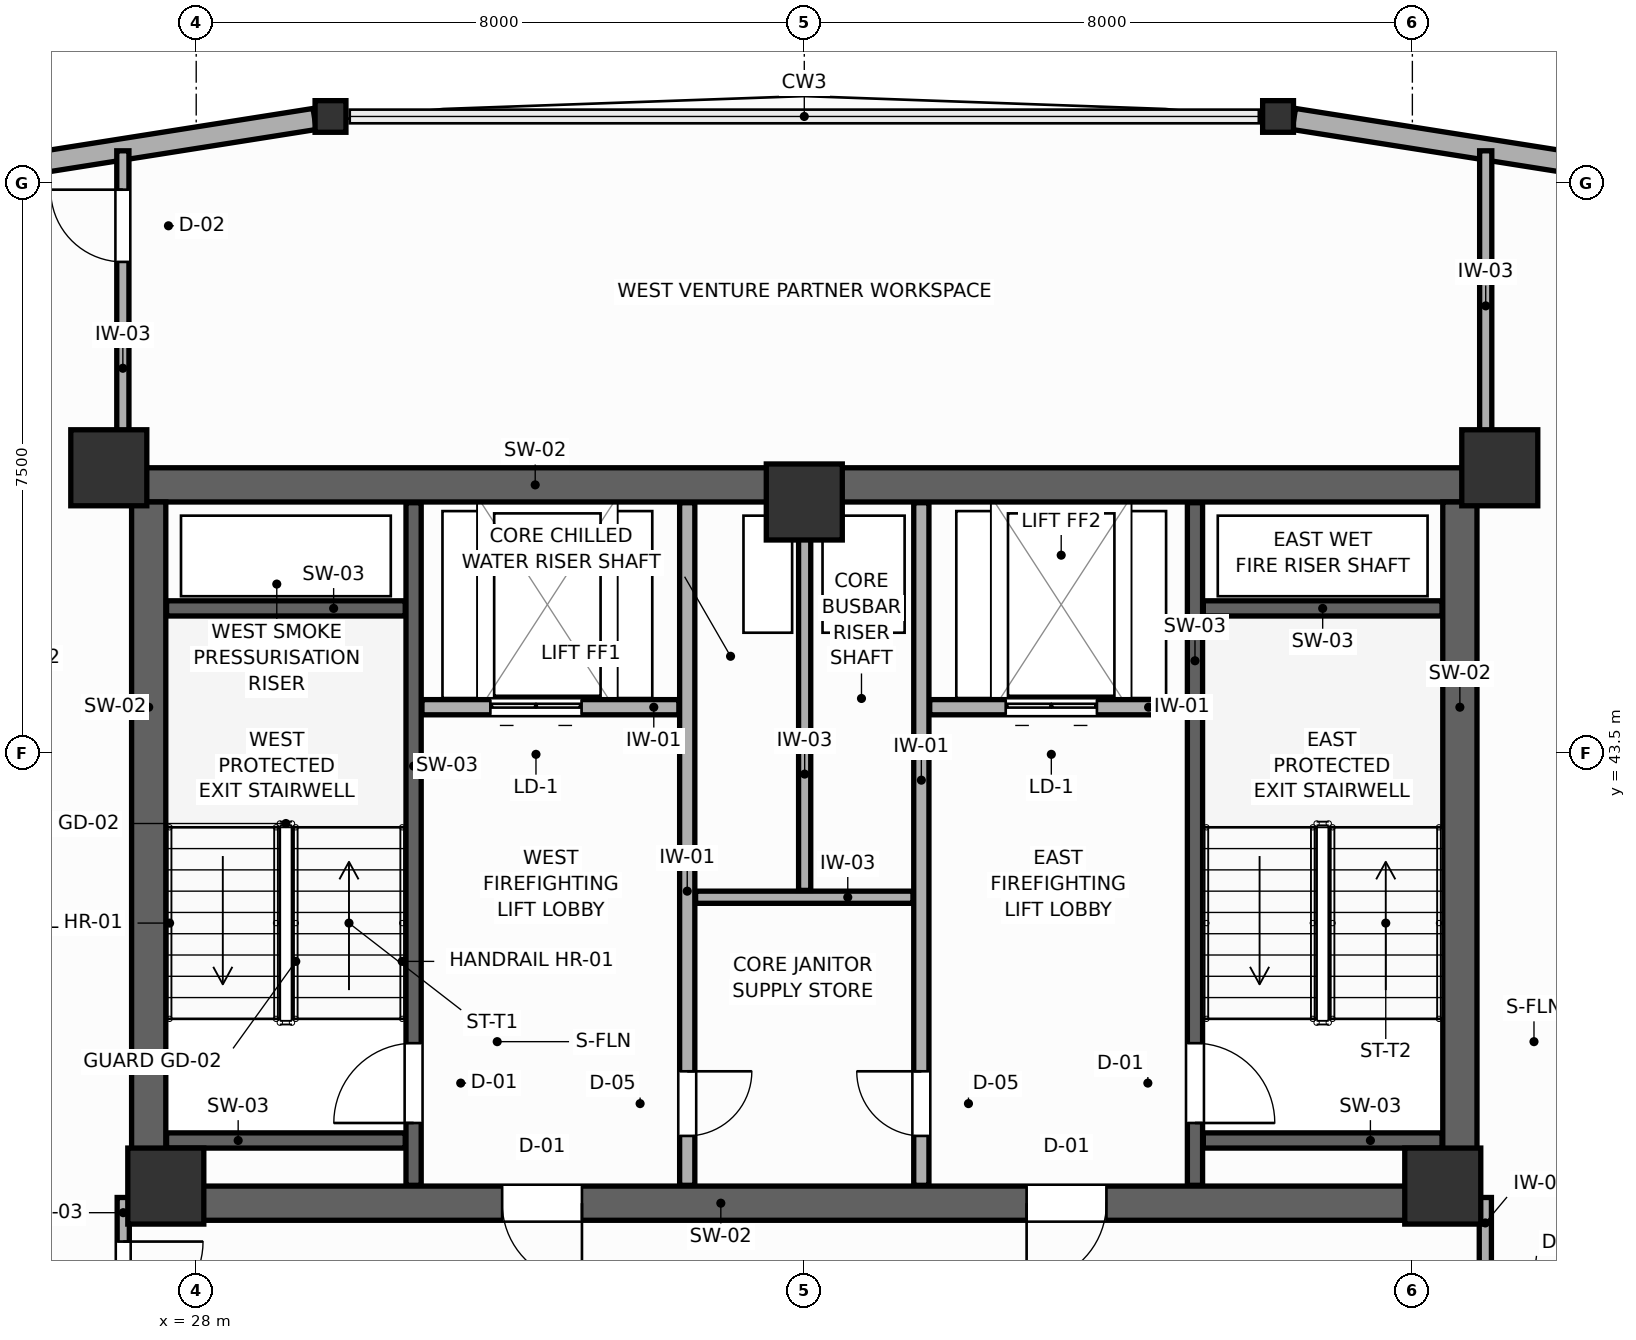
"""IFC4 building model, lengths in metres.
Left out: names, types, materials, properties, quantities, classifications, styles, units other than length and angle.
Written with IfcOpenShell. Run it as: python <this file> out.ifc"""

import sys

from ifc_helpers import new_model, si_unit, direction, frame, frame_2d, origin, origin_2d, place, context, subcontext, project, spatial, rectangle, i_section, extrude, source, transform, mapped, element, fill, save


model = new_model("IFC4")
c1 = context("Model", 3, precision=1e-05, world=origin(), true_north=direction((0.0, 1.0)))
c2 = subcontext(c1, "Body", "Model", "MODEL_VIEW")
j1 = project(units=[si_unit("LENGTHUNIT", "METRE"), si_unit("PLANEANGLEUNIT", "RADIAN")], contexts=[c1])
p1 = place(None, origin())
s1 = spatial("IfcSite", under=j1, at=p1, CompositionType="ELEMENT")
p2 = place(p1, origin())
s2 = spatial("IfcBuilding", under=s1, at=p2, CompositionType="ELEMENT")
p3 = place(p2, frame((0.0, 0.0, 193.8)))
s3 = spatial("IfcBuildingStorey", under=s2, at=p3, CompositionType="ELEMENT", Elevation=193.8)
p4 = place(p3, frame((27.15, 47.025, 0.0), z_axis=(0.0, 0.0, 1.0), x_axis=(1.0, 0.0, 0.0)))
e1 = element("IfcWall", 1, at=p4, inside=s3, PredefinedType="SHEAR", context=c2, shape_type="SweptSolid", body=[
    extrude(rectangle(XDim=17.7, YDim=0.45, at=frame_2d((8.85, 0.0))), origin(), (0.0, 0.0, 1.0), 3.6),
])
p5 = place(p3, frame((27.15, 37.575, 0.0), z_axis=(0.0, 0.0, 1.0), x_axis=(1.0, 0.0, 0.0)))
e2 = element("IfcWall", 2, at=p5, inside=s3, PredefinedType="SHEAR", context=c2, shape_type="SweptSolid", body=[
    extrude(rectangle(XDim=17.7, YDim=0.45, at=frame_2d((8.85, 0.0))), origin(), (0.0, 0.0, 1.0), 3.6),
])
p6 = place(p5, frame((4.875, 0.0, 0.0)))
e3 = element("IfcOpeningElement", 3, at=p6, cuts=e2, PredefinedType="OPENING", context=c2, shape_type="SweptSolid", body=[
    extrude(rectangle(XDim=1.05, YDim=2.1, at=frame_2d((0.525, 1.05))), frame((0.0, 0.235, 0.0), z_axis=(0.0, -1.0, 0.0), x_axis=(1.0, 0.0, 0.0)), (0.0, 0.0, 1.0), 0.47),
])
p7 = place(p5, frame((11.775, 0.0, 0.0)))
e4 = element("IfcOpeningElement", 4, at=p7, cuts=e2, PredefinedType="OPENING", context=c2, shape_type="SweptSolid", body=[
    extrude(rectangle(XDim=1.05, YDim=2.1, at=frame_2d((0.525, 1.05))), frame((0.0, 0.235, 0.0), z_axis=(0.0, -1.0, 0.0), x_axis=(1.0, 0.0, 0.0)), (0.0, 0.0, 1.0), 0.47),
])
for number, where, z_axis, x_axis in (
    (5, (27.375, 37.8, 0.0), (0.0, 0.0, 1.0), (0.0, 1.0, 0.0)),
    (6, (44.625, 37.8, 0.0), (0.0, 0.0, 1.0), (0.0, 1.0, 0.0)),
):
    element("IfcWall", number, at=place(p3, frame(where, z_axis=z_axis, x_axis=x_axis)), inside=s3, PredefinedType="SHEAR", context=c2, shape_type="SweptSolid", body=[
        extrude(rectangle(XDim=9.0, YDim=0.45, at=frame_2d((4.5, 0.0))), origin(), (0.0, 0.0, 1.0), 3.6),
    ])
m1 = source(origin(), c2, "Body", "SweptSolid", [
    extrude(rectangle(XDim=1.0, YDim=1.0, at=origin_2d()), origin(), (0.0, 0.0, 1.0), 3.6),
])
for number, where, z_axis, x_axis in (
    (7, (26.85, 47.25, 0.0), (0.0, 0.0, 1.0), (1.0, 0.0, 0.0)),
    (8, (45.15, 47.25, 0.0), (0.0, 0.0, 1.0), (1.0, 0.0, 0.0)),
    (9, (27.6, 37.8, 0.0), (0.0, 0.0, 1.0), (1.0, 0.0, 0.0)),
    (10, (44.4, 37.8, 0.0), (0.0, 0.0, 1.0), (1.0, 0.0, 0.0)),
    (11, (36.0, 46.8, 0.0), (0.0, 0.0, 1.0), (1.0, 0.0, 0.0)),
):
    element("IfcColumn", number, at=place(p3, frame(where, z_axis=z_axis, x_axis=x_axis)), inside=s3, PredefinedType="COLUMN", context=c2, shape_type="MappedRepresentation", body=[
        mapped(m1, transform((0.0, 0.0, 0.0), scale=1.0)),
    ])
m2 = source(origin(), c2, "Body", "SweptSolid", [
    extrude(i_section(OverallWidth=0.406, OverallDepth=0.416, WebThickness=0.027, FlangeThickness=0.044, FilletRadius=0.015, at=origin_2d()), origin(), (0.0, 0.0, 1.0), 3.6),
])
for number, where, z_axis, x_axis in (
    (12, (42.233, 51.872, 0.0), (0.0, 0.0, 1.0), (1.0, 0.0, 0.0)),
    (13, (29.767, 51.872, 0.0), (0.0, 0.0, 1.0), (1.0, 0.0, 0.0)),
):
    element("IfcColumn", number, at=place(p3, frame(where, z_axis=z_axis, x_axis=x_axis)), inside=s3, PredefinedType="COLUMN", context=c2, shape_type="MappedRepresentation", body=[
        mapped(m2, transform((0.0, 0.0, 0.0), scale=1.0)),
    ])
p8 = place(p3, frame((56.258, 49.656, 0.0), z_axis=(0.0, 0.0, 1.0), x_axis=(-0.987743003355, 0.15608894683, 0.0)))
e14 = element("IfcWall", 14, at=p8, inside=s3, PredefinedType="SOLIDWALL", context=c2, shape_type="SweptSolid", body=[
    extrude(rectangle(XDim=13.988, YDim=0.28, at=frame_2d((6.994, 0.0))), origin(), (0.0, 0.0, 1.0), 3.01),
])
p9 = place(p3, frame((29.559, 51.839, 0.0), z_axis=(0.0, 0.0, 1.0), x_axis=(-0.987743003355, -0.15608894683, 0.0)))
e15 = element("IfcWall", 15, at=p9, inside=s3, PredefinedType="SOLIDWALL", context=c2, shape_type="SweptSolid", body=[
    extrude(rectangle(XDim=13.988, YDim=0.28, at=frame_2d((6.994, 0.0))), origin(), (0.0, 0.0, 1.0), 2.95),
])
p10 = place(p3, frame((30.86, 37.81, 0.0), z_axis=(0.0, 0.0, 1.0), x_axis=(0.0, 1.0, 0.0)))
e16 = element("IfcWall", 16, at=p10, inside=s3, PredefinedType="SHEAR", context=c2, shape_type="SweptSolid", body=[
    extrude(rectangle(XDim=8.98, YDim=0.2, at=frame_2d((4.49, 0.0))), origin(), (0.0, 0.0, 1.0), 3.6),
])
p11 = place(p10, frame((0.82, 0.0, 0.0)))
e17 = element("IfcOpeningElement", 17, at=p11, cuts=e16, PredefinedType="OPENING", context=c2, shape_type="SweptSolid", body=[
    extrude(rectangle(XDim=1.05, YDim=2.1, at=frame_2d((0.525, 1.05))), frame((0.0, 0.11, 0.0), z_axis=(0.0, -1.0, 0.0), x_axis=(1.0, 0.0, 0.0)), (0.0, 0.0, 1.0), 0.22),
])
for number, where, z_axis, x_axis in (
    (18, (27.61, 45.4, 0.0), (0.0, 0.0, 1.0), (1.0, 0.0, 0.0)),
    (19, (27.61, 38.4, 0.0), (0.0, 0.0, 1.0), (1.0, 0.0, 0.0)),
):
    element("IfcWall", number, at=place(p3, frame(where, z_axis=z_axis, x_axis=x_axis)), inside=s3, PredefinedType="SHEAR", context=c2, shape_type="SweptSolid", body=[
        extrude(rectangle(XDim=3.14, YDim=0.2, at=frame_2d((1.57, 0.0))), origin(), (0.0, 0.0, 1.0), 3.6),
    ])
p12 = place(p3, frame((41.14, 37.81, 0.0), z_axis=(0.0, 0.0, 1.0), x_axis=(0.0, 1.0, 0.0)))
e20 = element("IfcWall", 20, at=p12, inside=s3, PredefinedType="SHEAR", context=c2, shape_type="SweptSolid", body=[
    extrude(rectangle(XDim=8.98, YDim=0.2, at=frame_2d((4.49, 0.0))), origin(), (0.0, 0.0, 1.0), 3.6),
])
p13 = place(p12, frame((0.82, 0.0, 0.0)))
e21 = element("IfcOpeningElement", 21, at=p13, cuts=e20, PredefinedType="OPENING", context=c2, shape_type="SweptSolid", body=[
    extrude(rectangle(XDim=1.05, YDim=2.1, at=frame_2d((0.525, 1.05))), frame((0.0, 0.11, 0.0), z_axis=(0.0, -1.0, 0.0), x_axis=(1.0, 0.0, 0.0)), (0.0, 0.0, 1.0), 0.22),
])
for number, where, z_axis, x_axis in (
    (22, (41.25, 45.4, 0.0), (0.0, 0.0, 1.0), (1.0, 0.0, 0.0)),
    (23, (41.25, 38.4, 0.0), (0.0, 0.0, 1.0), (1.0, 0.0, 0.0)),
):
    element("IfcWall", number, at=place(p3, frame(where, z_axis=z_axis, x_axis=x_axis)), inside=s3, PredefinedType="SHEAR", context=c2, shape_type="SweptSolid", body=[
        extrude(rectangle(XDim=3.14, YDim=0.2, at=frame_2d((1.57, 0.0))), origin(), (0.0, 0.0, 1.0), 3.6),
    ])
p14 = place(p3, frame((30.97, 44.1, 0.0), z_axis=(0.0, 0.0, 1.0), x_axis=(1.0, 0.0, 0.0)))
e24 = element("IfcWall", 24, at=p14, inside=s3, PredefinedType="PARTITIONING", context=c2, shape_type="SweptSolid", body=[
    extrude(rectangle(XDim=3.38, YDim=0.2, at=frame_2d((1.69, 0.0))), origin(), (0.0, 0.0, 1.0), 3.4),
])
p15 = place(p14, frame((0.9, 0.0, 0.0)))
e25 = element("IfcOpeningElement", 25, at=p15, cuts=e24, PredefinedType="OPENING", context=c2, shape_type="SweptSolid", body=[
    extrude(rectangle(XDim=1.2, YDim=2.1, at=frame_2d((0.6, 1.05))), frame((0.0, 0.11, 0.0), z_axis=(0.0, -1.0, 0.0), x_axis=(1.0, 0.0, 0.0)), (0.0, 0.0, 1.0), 0.22),
])
p16 = place(p3, frame((37.65, 44.1, 0.0), z_axis=(0.0, 0.0, 1.0), x_axis=(1.0, 0.0, 0.0)))
e26 = element("IfcWall", 26, at=p16, inside=s3, PredefinedType="PARTITIONING", context=c2, shape_type="SweptSolid", body=[
    extrude(rectangle(XDim=3.38, YDim=0.2, at=frame_2d((1.69, 0.0))), origin(), (0.0, 0.0, 1.0), 3.4),
])
p17 = place(p16, frame((1.0, 0.0, 0.0)))
e27 = element("IfcOpeningElement", 27, at=p17, cuts=e26, PredefinedType="OPENING", context=c2, shape_type="SweptSolid", body=[
    extrude(rectangle(XDim=1.2, YDim=2.1, at=frame_2d((0.6, 1.05))), frame((0.0, 0.11, 0.0), z_axis=(0.0, -1.0, 0.0), x_axis=(1.0, 0.0, 0.0)), (0.0, 0.0, 1.0), 0.22),
])
p18 = place(p3, frame((34.46, 37.81, 0.0), z_axis=(0.0, 0.0, 1.0), x_axis=(0.0, 1.0, 0.0)))
e28 = element("IfcWall", 28, at=p18, inside=s3, PredefinedType="PARTITIONING", context=c2, shape_type="SweptSolid", body=[
    extrude(rectangle(XDim=8.98, YDim=0.2, at=frame_2d((4.49, 0.0))), origin(), (0.0, 0.0, 1.0), 3.4),
])
p19 = place(p18, frame((0.65, 0.0, 0.0)))
e29 = element("IfcOpeningElement", 29, at=p19, cuts=e28, PredefinedType="OPENING", context=c2, shape_type="SweptSolid", body=[
    extrude(rectangle(XDim=0.85, YDim=2.05, at=frame_2d((0.425, 1.025))), frame((0.0, 0.11, 0.0), z_axis=(0.0, -1.0, 0.0), x_axis=(1.0, 0.0, 0.0)), (0.0, 0.0, 1.0), 0.22),
])
p20 = place(p3, frame((37.54, 37.81, 0.0), z_axis=(0.0, 0.0, 1.0), x_axis=(0.0, 1.0, 0.0)))
e30 = element("IfcWall", 30, at=p20, inside=s3, PredefinedType="PARTITIONING", context=c2, shape_type="SweptSolid", body=[
    extrude(rectangle(XDim=8.98, YDim=0.2, at=frame_2d((4.49, 0.0))), origin(), (0.0, 0.0, 1.0), 3.4),
])
p21 = place(p20, frame((0.65, 0.0, 0.0)))
e31 = element("IfcOpeningElement", 31, at=p21, cuts=e30, PredefinedType="OPENING", context=c2, shape_type="SweptSolid", body=[
    extrude(rectangle(XDim=0.85, YDim=2.05, at=frame_2d((0.425, 1.025))), frame((0.0, 0.11, 0.0), z_axis=(0.0, -1.0, 0.0), x_axis=(1.0, 0.0, 0.0)), (0.0, 0.0, 1.0), 0.22),
])
p22 = place(p3, frame((34.57, 41.6, 0.0), z_axis=(0.0, 0.0, 1.0), x_axis=(1.0, 0.0, 0.0)))
e32 = element("IfcWall", 32, at=p22, inside=s3, PredefinedType="PARTITIONING", context=c2, shape_type="SweptSolid", body=[
    extrude(rectangle(XDim=2.86, YDim=0.16, at=frame_2d((1.43, 0.0))), origin(), (0.0, 0.0, 1.0), 3.4),
])
p23 = place(p3, frame((36.005, 41.69, 0.0), z_axis=(0.0, 0.0, 1.0), x_axis=(0.0, 1.0, 0.0)))
e33 = element("IfcWall", 33, at=p23, inside=s3, PredefinedType="PARTITIONING", context=c2, shape_type="SweptSolid", body=[
    extrude(rectangle(XDim=5.1, YDim=0.16, at=frame_2d((2.55, 0.0))), origin(), (0.0, 0.0, 1.0), 3.4),
])
p24 = place(p3, frame((27.04, 35.54, 0.0), z_axis=(0.0, 0.0, 1.0), x_axis=(0.0, 1.0, 0.0)))
e34 = element("IfcWall", 34, at=p24, inside=s3, PredefinedType="PARTITIONING", context=c2, shape_type="SweptSolid", body=[
    extrude(rectangle(XDim=2.11, YDim=0.16, at=frame_2d((1.055, 0.0))), origin(), (0.0, 0.0, 1.0), 3.4),
])
p25 = place(p24, frame((0.48, 0.0, 0.0)))
e35 = element("IfcOpeningElement", 35, at=p25, cuts=e34, PredefinedType="OPENING", context=c2, shape_type="SweptSolid", body=[
    extrude(rectangle(XDim=1.05, YDim=2.1, at=frame_2d((0.525, 1.05))), frame((0.0, 0.09, 0.0), z_axis=(0.0, -1.0, 0.0), x_axis=(1.0, 0.0, 0.0)), (0.0, 0.0, 1.0), 0.18),
])
p26 = place(p3, frame((44.96, 35.0, 0.0), z_axis=(0.0, 0.0, 1.0), x_axis=(0.0, 1.0, 0.0)))
e36 = element("IfcWall", 36, at=p26, inside=s3, PredefinedType="PARTITIONING", context=c2, shape_type="SweptSolid", body=[
    extrude(rectangle(XDim=2.65, YDim=0.16, at=frame_2d((1.325, 0.0))), origin(), (0.0, 0.0, 1.0), 3.4),
])
p27 = place(p26, frame((0.75, 0.0, 0.0)))
e37 = element("IfcOpeningElement", 37, at=p27, cuts=e36, PredefinedType="OPENING", context=c2, shape_type="SweptSolid", body=[
    extrude(rectangle(XDim=1.05, YDim=2.1, at=frame_2d((0.525, 1.05))), frame((0.0, 0.09, 0.0), z_axis=(0.0, -1.0, 0.0), x_axis=(1.0, 0.0, 0.0)), (0.0, 0.0, 1.0), 0.18),
])
p28 = place(p3, frame((27.035, 47.34, 0.0), z_axis=(0.0, 0.0, 1.0), x_axis=(0.0, 1.0, 0.0)))
e38 = element("IfcWall", 38, at=p28, inside=s3, PredefinedType="PARTITIONING", context=c2, shape_type="SweptSolid", body=[
    extrude(rectangle(XDim=4.08, YDim=0.16, at=frame_2d((2.04, 0.0))), origin(), (0.0, 0.0, 1.0), 3.4),
])
p29 = place(p28, frame((2.618, 0.0, 0.0)))
e39 = element("IfcOpeningElement", 39, at=p29, cuts=e38, PredefinedType="OPENING", context=c2, shape_type="SweptSolid", body=[
    extrude(rectangle(XDim=0.95, YDim=2.05, at=frame_2d((0.475, 1.025))), frame((0.0, 0.09, 0.0), z_axis=(0.0, -1.0, 0.0), x_axis=(1.0, 0.0, 0.0)), (0.0, 0.0, 1.0), 0.18),
])
p30 = place(p3, frame((44.965, 47.34, 0.0), z_axis=(0.0, 0.0, 1.0), x_axis=(0.0, 1.0, 0.0)))
e40 = element("IfcWall", 40, at=p30, inside=s3, PredefinedType="PARTITIONING", context=c2, shape_type="SweptSolid", body=[
    extrude(rectangle(XDim=4.08, YDim=0.16, at=frame_2d((2.04, 0.0))), origin(), (0.0, 0.0, 1.0), 3.4),
])
p31 = place(p11, origin())
e41 = element("IfcDoor", 41, at=p31, inside=s3, OperationType="SINGLE_SWING_LEFT", PredefinedType="DOOR", context=c2, shape_type="SweptSolid", body=[
    extrude(rectangle(XDim=1.05, YDim=2.1, at=frame_2d((0.525, 1.05))), frame((0.0, 0.025, 0.0), z_axis=(0.0, -1.0, 0.0), x_axis=(1.0, 0.0, 0.0)), (0.0, 0.0, 1.0), 0.05),
])
fill(e17, e41)
p32 = place(p13, frame((1.05, 0.0, 0.0), z_axis=(0.0, 0.0, 1.0), x_axis=(-1.0, 0.0, 0.0)))
e42 = element("IfcDoor", 42, at=p32, inside=s3, OperationType="SINGLE_SWING_RIGHT", PredefinedType="DOOR", context=c2, shape_type="SweptSolid", body=[
    extrude(rectangle(XDim=1.05, YDim=2.1, at=frame_2d((0.525, 1.05))), frame((0.0, 0.025, 0.0), z_axis=(0.0, -1.0, 0.0), x_axis=(1.0, 0.0, 0.0)), (0.0, 0.0, 1.0), 0.05),
])
fill(e21, e42)
p33 = place(p15, origin())
e43 = element("IfcDoor", 43, at=p33, inside=s3, OperationType="DOUBLE_DOOR_SLIDING", PredefinedType="DOOR", context=c2, shape_type="SweptSolid", body=[
    extrude(rectangle(XDim=1.2, YDim=2.1, at=frame_2d((0.6, 1.05))), frame((0.0, 0.025, 0.0), z_axis=(0.0, -1.0, 0.0), x_axis=(1.0, 0.0, 0.0)), (0.0, 0.0, 1.0), 0.05),
])
fill(e25, e43)
p34 = place(p17, origin())
e44 = element("IfcDoor", 44, at=p34, inside=s3, OperationType="DOUBLE_DOOR_SLIDING", PredefinedType="DOOR", context=c2, shape_type="SweptSolid", body=[
    extrude(rectangle(XDim=1.2, YDim=2.1, at=frame_2d((0.6, 1.05))), frame((0.0, 0.025, 0.0), z_axis=(0.0, -1.0, 0.0), x_axis=(1.0, 0.0, 0.0)), (0.0, 0.0, 1.0), 0.05),
])
fill(e27, e44)
p35 = place(p19, frame((0.85, 0.0, 0.0), z_axis=(0.0, 0.0, 1.0), x_axis=(-1.0, 0.0, 0.0)))
e45 = element("IfcDoor", 45, at=p35, inside=s3, OperationType="SINGLE_SWING_LEFT", PredefinedType="DOOR", context=c2, shape_type="SweptSolid", body=[
    extrude(rectangle(XDim=0.85, YDim=2.05, at=frame_2d((0.425, 1.025))), frame((0.0, 0.025, 0.0), z_axis=(0.0, -1.0, 0.0), x_axis=(1.0, 0.0, 0.0)), (0.0, 0.0, 1.0), 0.05),
])
fill(e29, e45)
p36 = place(p21, origin())
e46 = element("IfcDoor", 46, at=p36, inside=s3, OperationType="SINGLE_SWING_RIGHT", PredefinedType="DOOR", context=c2, shape_type="SweptSolid", body=[
    extrude(rectangle(XDim=0.85, YDim=2.05, at=frame_2d((0.425, 1.025))), frame((0.0, 0.025, 0.0), z_axis=(0.0, -1.0, 0.0), x_axis=(1.0, 0.0, 0.0)), (0.0, 0.0, 1.0), 0.05),
])
fill(e31, e46)
p37 = place(p25, frame((1.05, 0.0, 0.0), z_axis=(0.0, 0.0, 1.0), x_axis=(-1.0, 0.0, 0.0)))
e47 = element("IfcDoor", 47, at=p37, inside=s3, OperationType="SINGLE_SWING_LEFT", PredefinedType="DOOR", context=c2, shape_type="SweptSolid", body=[
    extrude(rectangle(XDim=1.05, YDim=2.1, at=frame_2d((0.525, 1.05))), frame((0.0, 0.025, 0.0), z_axis=(0.0, -1.0, 0.0), x_axis=(1.0, 0.0, 0.0)), (0.0, 0.0, 1.0), 0.05),
])
fill(e35, e47)
p38 = place(p29, origin())
e48 = element("IfcDoor", 48, at=p38, inside=s3, OperationType="SINGLE_SWING_RIGHT", PredefinedType="DOOR", context=c2, shape_type="SweptSolid", body=[
    extrude(rectangle(XDim=0.95, YDim=2.05, at=frame_2d((0.475, 1.025))), frame((0.0, 0.025, 0.0), z_axis=(0.0, -1.0, 0.0), x_axis=(1.0, 0.0, 0.0)), (0.0, 0.0, 1.0), 0.05),
])
fill(e39, e48)
p39 = place(p6, frame((1.05, 0.0, 0.0), z_axis=(0.0, 0.0, 1.0), x_axis=(-1.0, 0.0, 0.0)))
e49 = element("IfcDoor", 49, at=p39, inside=s3, OperationType="SINGLE_SWING_LEFT", PredefinedType="DOOR", context=c2, shape_type="SweptSolid", body=[
    extrude(rectangle(XDim=1.05, YDim=2.1, at=frame_2d((0.525, 1.05))), frame((0.0, 0.025, 0.0), z_axis=(0.0, -1.0, 0.0), x_axis=(1.0, 0.0, 0.0)), (0.0, 0.0, 1.0), 0.05),
])
fill(e3, e49)
p40 = place(p7, frame((1.05, 0.0, 0.0), z_axis=(0.0, 0.0, 1.0), x_axis=(-1.0, 0.0, 0.0)))
e50 = element("IfcDoor", 50, at=p40, inside=s3, OperationType="SINGLE_SWING_RIGHT", PredefinedType="DOOR", context=c2, shape_type="SweptSolid", body=[
    extrude(rectangle(XDim=1.05, YDim=2.1, at=frame_2d((0.525, 1.05))), frame((0.0, 0.025, 0.0), z_axis=(0.0, -1.0, 0.0), x_axis=(1.0, 0.0, 0.0)), (0.0, 0.0, 1.0), 0.05),
])
fill(e4, e50)
save(model, sys.argv[1])
